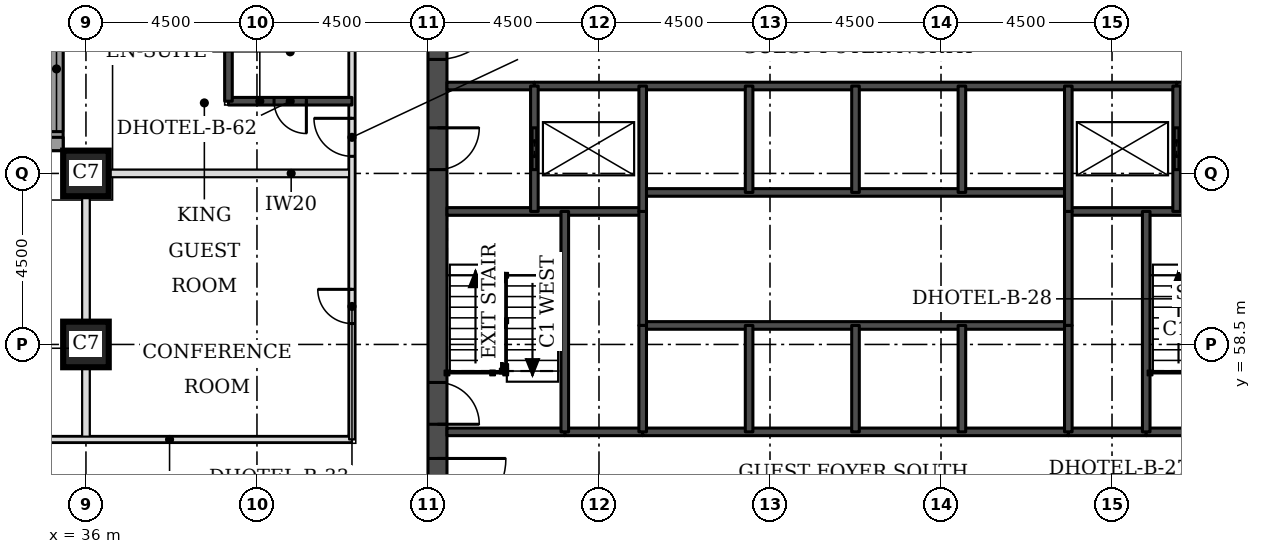
"""IFC4 building model, lengths in metres.
Left out: names, types, materials, properties, quantities, classifications, styles, units other than length and angle.
Written with IfcOpenShell. Run it as: python <this file> out.ifc"""

import sys

from ifc_helpers import new_model, si_unit, direction, frame, frame_2d, origin, origin_2d, place, context, subcontext, project, spatial, rectangle, extrude, element, fill, save


model = new_model("IFC4")
c1 = context("Model", 3, precision=1e-05, world=origin(), true_north=direction((0.0, 1.0)))
c2 = subcontext(c1, "Body", "Model", "MODEL_VIEW")
j1 = project(units=[si_unit("LENGTHUNIT", "METRE"), si_unit("PLANEANGLEUNIT", "RADIAN")], contexts=[c1])
p1 = place(None, origin())
s1 = spatial("IfcSite", under=j1, at=p1, CompositionType="ELEMENT")
p2 = place(p1, origin())
s2 = spatial("IfcBuilding", under=s1, at=p2, CompositionType="ELEMENT")
p3 = place(p2, frame((0.0, 0.0, 52.8)))
s3 = spatial("IfcBuildingStorey", under=s2, at=p3, CompositionType="ELEMENT", Elevation=52.8)
for number, where, z_axis, x_axis in (
    (1, (36.0, 58.5, 0.0), (0.0, 0.0, 1.0), (1.0, 0.0, 0.0)),
    (2, (36.0, 63.0, 0.0), (0.0, 0.0, 1.0), (1.0, 0.0, 0.0)),
):
    element("IfcColumn", number, at=place(p3, frame(where, z_axis=z_axis, x_axis=x_axis)), inside=s3, PredefinedType="COLUMN", context=c2, shape_type="SweptSolid", body=[
        extrude(rectangle(XDim=1.2, YDim=1.2, at=origin_2d()), origin(), (0.0, 0.0, 1.0), 3.3),
    ])
p4 = place(p3, frame((45.25, 49.5, 0.0), z_axis=(0.0, 0.0, 1.0), x_axis=(0.0, 1.0, 0.0)))
e3 = element("IfcWall", 3, at=p4, inside=s3, PredefinedType="SHEAR", context=c2, shape_type="SweptSolid", body=[
    extrude(rectangle(XDim=22.5, YDim=0.5, at=frame_2d((11.25, 0.0))), origin(), (0.0, 0.0, 1.0), 3.3),
])
p5 = place(p4, frame((4.2, 0.0, 0.0)))
e4 = element("IfcOpeningElement", 4, at=p5, cuts=e3, PredefinedType="OPENING", context=c2, shape_type="SweptSolid", body=[
    extrude(rectangle(XDim=1.8, YDim=2.1, at=frame_2d((0.9, 1.05))), frame((0.0, 0.26, 0.0), z_axis=(0.0, -1.0, 0.0), x_axis=(1.0, 0.0, 0.0)), (0.0, 0.0, 1.0), 0.52),
])
p6 = place(p4, frame((6.9, 0.0, 0.0)))
e5 = element("IfcOpeningElement", 5, at=p6, cuts=e3, PredefinedType="OPENING", context=c2, shape_type="SweptSolid", body=[
    extrude(rectangle(XDim=1.1, YDim=2.1, at=frame_2d((0.55, 1.05))), frame((0.0, 0.26, 0.0), z_axis=(0.0, -1.0, 0.0), x_axis=(1.0, 0.0, 0.0)), (0.0, 0.0, 1.0), 0.52),
])
p7 = place(p4, frame((13.6, 0.0, 0.0)))
e6 = element("IfcOpeningElement", 6, at=p7, cuts=e3, PredefinedType="OPENING", context=c2, shape_type="SweptSolid", body=[
    extrude(rectangle(XDim=1.1, YDim=2.1, at=frame_2d((0.55, 1.05))), frame((0.0, 0.26, 0.0), z_axis=(0.0, -1.0, 0.0), x_axis=(1.0, 0.0, 0.0)), (0.0, 0.0, 1.0), 0.52),
])
p8 = place(p4, frame((16.5, 0.0, 0.0)))
e7 = element("IfcOpeningElement", 7, at=p8, cuts=e3, PredefinedType="OPENING", context=c2, shape_type="SweptSolid", body=[
    extrude(rectangle(XDim=1.8, YDim=2.1, at=frame_2d((0.9, 1.05))), frame((0.0, 0.26, 0.0), z_axis=(0.0, -1.0, 0.0), x_axis=(1.0, 0.0, 0.0)), (0.0, 0.0, 1.0), 0.52),
])
p9 = place(p3, frame((35.225, 76.894, 0.0), z_axis=(0.0, 0.0, 1.0), x_axis=(0.0, -1.0, 0.0)))
e8 = element("IfcWall", 8, at=p9, inside=s3, PredefinedType="STANDARD", context=c2, shape_type="SweptSolid", body=[
    extrude(rectangle(XDim=13.293, YDim=0.35, at=frame_2d((6.647, 0.0))), origin(), (0.0, 0.0, 1.0), 3.055),
])
p10 = place(p9, frame((9.493, 0.0, 0.8)))
e9 = element("IfcOpeningElement", 9, at=p10, cuts=e8, PredefinedType="OPENING", context=c2, shape_type="SweptSolid", body=[
    extrude(rectangle(XDim=3.3, YDim=1.5, at=frame_2d((1.65, 0.75))), frame((0.0, 0.185, 0.0), z_axis=(0.0, -1.0, 0.0), x_axis=(1.0, 0.0, 0.0)), (0.0, 0.0, 1.0), 0.37),
])
p11 = place(p3, frame((35.4, 63.775, 0.0), z_axis=(0.0, 0.0, 1.0), x_axis=(-1.0, 0.0, 0.0)))
e10 = element("IfcWall", 10, at=p11, inside=s3, PredefinedType="STANDARD", context=c2, shape_type="SweptSolid", body=[
    extrude(rectangle(XDim=17.793, YDim=0.35, at=frame_2d((8.897, 0.0))), origin(), (0.0, 0.0, 1.0), 3.055),
])
p12 = place(p11, frame((0.5, 0.0, 0.8)))
e11 = element("IfcOpeningElement", 11, at=p12, cuts=e10, PredefinedType="OPENING", context=c2, shape_type="SweptSolid", body=[
    extrude(rectangle(XDim=3.3, YDim=1.5, at=frame_2d((1.65, 0.75))), frame((0.0, 0.185, 0.0), z_axis=(0.0, -1.0, 0.0), x_axis=(1.0, 0.0, 0.0)), (0.0, 0.0, 1.0), 0.37),
])
p13 = place(p11, frame((9.0, 0.0, 0.8)))
e12 = element("IfcOpeningElement", 12, at=p13, cuts=e10, PredefinedType="OPENING", context=c2, shape_type="SweptSolid", body=[
    extrude(rectangle(XDim=3.3, YDim=1.5, at=frame_2d((1.65, 0.75))), frame((0.0, 0.185, 0.0), z_axis=(0.0, -1.0, 0.0), x_axis=(1.0, 0.0, 0.0)), (0.0, 0.0, 1.0), 0.37),
])
p14 = place(p3, frame((36.0, 56.0, 0.0), z_axis=(0.0, 0.0, 1.0), x_axis=(0.0, 1.0, 0.0)))
e13 = element("IfcWall", 13, at=p14, inside=s3, PredefinedType="PARTITIONING", context=c2, shape_type="SweptSolid", body=[
    extrude(rectangle(XDim=6.4, YDim=0.2, at=frame_2d((3.2, 0.0))), origin(), (0.0, 0.0, 1.0), 2.33),
])
p15 = place(p3, frame((36.6, 63.0, 0.0), z_axis=(0.0, 0.0, 1.0), x_axis=(1.0, 0.0, 0.0)))
e14 = element("IfcWall", 14, at=p15, inside=s3, PredefinedType="PARTITIONING", context=c2, shape_type="SweptSolid", body=[
    extrude(rectangle(XDim=6.4, YDim=0.2, at=frame_2d((3.2, 0.0))), origin(), (0.0, 0.0, 1.0), 3.08),
])
p16 = place(p3, frame((27.0, 56.0, 0.0), z_axis=(0.0, 0.0, 1.0), x_axis=(1.0, 0.0, 0.0)))
e15 = element("IfcWall", 15, at=p16, inside=s3, PredefinedType="PARTITIONING", context=c2, shape_type="SweptSolid", body=[
    extrude(rectangle(XDim=16.0, YDim=0.15, at=frame_2d((8.0, 0.0))), origin(), (0.0, 0.0, 1.0), 3.08),
])
p17 = place(p16, frame((5.6, 0.0, 0.0)))
e16 = element("IfcOpeningElement", 16, at=p17, cuts=e15, PredefinedType="OPENING", context=c2, shape_type="SweptSolid", body=[
    extrude(rectangle(XDim=1.0, YDim=2.1, at=frame_2d((0.5, 1.05))), frame((0.0, 0.085, 0.0), z_axis=(0.0, -1.0, 0.0), x_axis=(1.0, 0.0, 0.0)), (0.0, 0.0, 1.0), 0.17),
])
p18 = place(p3, frame((43.0, 56.0, 0.0), z_axis=(0.0, 0.0, 1.0), x_axis=(0.0, 1.0, 0.0)))
e17 = element("IfcWall", 17, at=p18, inside=s3, PredefinedType="PARTITIONING", context=c2, shape_type="SweptSolid", body=[
    extrude(rectangle(XDim=18.0, YDim=0.15, at=frame_2d((9.0, 0.0))), origin(), (0.0, 0.0, 1.0), 3.08),
])
p19 = place(p18, frame((7.45, 0.0, 0.0)))
e18 = element("IfcOpeningElement", 18, at=p19, cuts=e17, PredefinedType="OPENING", context=c2, shape_type="SweptSolid", body=[
    extrude(rectangle(XDim=1.0, YDim=2.1, at=frame_2d((0.5, 1.05))), frame((0.0, 0.085, 0.0), z_axis=(0.0, -1.0, 0.0), x_axis=(1.0, 0.0, 0.0)), (0.0, 0.0, 1.0), 0.17),
])
p20 = place(p18, frame((14.3, 0.0, 0.0)))
e19 = element("IfcOpeningElement", 19, at=p20, cuts=e17, PredefinedType="OPENING", context=c2, shape_type="SweptSolid", body=[
    extrude(rectangle(XDim=1.0, YDim=2.1, at=frame_2d((0.5, 1.05))), frame((0.0, 0.085, 0.0), z_axis=(0.0, -1.0, 0.0), x_axis=(1.0, 0.0, 0.0)), (0.0, 0.0, 1.0), 0.17),
])
p21 = place(p18, frame((16.45, 0.0, 0.0)))
e20 = element("IfcOpeningElement", 20, at=p21, cuts=e17, PredefinedType="OPENING", context=c2, shape_type="SweptSolid", body=[
    extrude(rectangle(XDim=1.0, YDim=2.1, at=frame_2d((0.5, 1.05))), frame((0.0, 0.085, 0.0), z_axis=(0.0, -1.0, 0.0), x_axis=(1.0, 0.0, 0.0)), (0.0, 0.0, 1.0), 0.17),
])
p22 = place(p18, frame((3.05, 0.0, 0.0)))
e21 = element("IfcOpeningElement", 21, at=p22, cuts=e17, PredefinedType="OPENING", context=c2, shape_type="SweptSolid", body=[
    extrude(rectangle(XDim=0.9, YDim=2.1, at=frame_2d((0.45, 1.05))), frame((0.0, 0.085, 0.0), z_axis=(0.0, -1.0, 0.0), x_axis=(1.0, 0.0, 0.0)), (0.0, 0.0, 1.0), 0.17),
])
p23 = place(p3, frame((39.75, 64.9, 0.0), z_axis=(0.0, 0.0, 1.0), x_axis=(1.0, 0.0, 0.0)))
e22 = element("IfcWall", 22, at=p23, inside=s3, PredefinedType="SOLIDWALL", context=c2, shape_type="SweptSolid", body=[
    extrude(rectangle(XDim=3.25, YDim=0.2, at=frame_2d((1.625, 0.0))), origin(), (0.0, 0.0, 1.0), 3.08),
])
p24 = place(p23, frame((1.2, 0.0, 0.0)))
e23 = element("IfcOpeningElement", 23, at=p24, cuts=e22, PredefinedType="OPENING", context=c2, shape_type="SweptSolid", body=[
    extrude(rectangle(XDim=0.85, YDim=2.1, at=frame_2d((0.425, 1.05))), frame((0.0, 0.11, 0.0), z_axis=(0.0, -1.0, 0.0), x_axis=(1.0, 0.0, 0.0)), (0.0, 0.0, 1.0), 0.22),
])
p25 = place(p3, frame((39.75, 64.9, 0.0), z_axis=(0.0, 0.0, 1.0), x_axis=(0.0, 1.0, 0.0)))
e24 = element("IfcWall", 24, at=p25, inside=s3, PredefinedType="SOLIDWALL", context=c2, shape_type="SweptSolid", body=[
    extrude(rectangle(XDim=2.6, YDim=0.2, at=frame_2d((1.3, 0.0))), origin(), (0.0, 0.0, 1.0), 3.08),
])
for number, where, z_axis, x_axis in (
    (25, (48.6, 56.2, 0.0), (0.0, 0.0, 1.0), (1.0, 0.0, 0.0)),
    (26, (61.85, 56.2, 0.0), (0.0, 0.0, 1.0), (1.0, 0.0, 0.0)),
):
    element("IfcWall", number, at=place(p3, frame(where, z_axis=z_axis, x_axis=x_axis)), inside=s3, PredefinedType="SOLIDWALL", context=c2, shape_type="SweptSolid", body=[
        extrude(rectangle(XDim=2.05, YDim=0.2, at=frame_2d((1.025, 0.0))), origin(), (0.0, 0.0, 1.0), 3.08),
    ])
p26 = place(p3, frame((45.5, 56.2, 0.0), z_axis=(0.0, 0.0, 1.0), x_axis=(1.0, 0.0, 0.0)))
e27 = element("IfcWall", 27, at=p26, inside=s3, PredefinedType="SOLIDWALL", context=c2, shape_type="SweptSolid", body=[
    extrude(rectangle(XDim=3.1, YDim=0.2, at=frame_2d((1.55, 0.0))), origin(), (0.0, 0.0, 1.0), 3.08),
])
p27 = place(p3, frame((50.65, 56.2, 0.0), z_axis=(0.0, 0.0, 1.0), x_axis=(1.0, 0.0, 0.0)))
e28 = element("IfcWall", 28, at=p27, inside=s3, PredefinedType="SOLIDWALL", context=c2, shape_type="SweptSolid", body=[
    extrude(rectangle(XDim=11.2, YDim=0.2, at=frame_2d((5.6, 0.0))), origin(), (0.0, 0.0, 1.0), 3.08),
])
p28 = place(p3, frame((63.9, 56.2, 0.0), z_axis=(0.0, 0.0, 1.0), x_axis=(1.0, 0.0, 0.0)))
e29 = element("IfcWall", 29, at=p28, inside=s3, PredefinedType="SOLIDWALL", context=c2, shape_type="SweptSolid", body=[
    extrude(rectangle(XDim=3.1, YDim=0.2, at=frame_2d((1.55, 0.0))), origin(), (0.0, 0.0, 1.0), 3.08),
])
p29 = place(p3, frame((50.65, 59.0, 0.0), z_axis=(0.0, 0.0, 1.0), x_axis=(1.0, 0.0, 0.0)))
e30 = element("IfcWall", 30, at=p29, inside=s3, PredefinedType="SOLIDWALL", context=c2, shape_type="SweptSolid", body=[
    extrude(rectangle(XDim=11.2, YDim=0.2, at=frame_2d((5.6, 0.0))), origin(), (0.0, 0.0, 1.0), 3.3),
])
for number, where, z_axis, x_axis in (
    (31, (45.5, 62.0, 0.0), (0.0, 0.0, 1.0), (1.0, 0.0, 0.0)),
    (32, (61.85, 62.0, 0.0), (0.0, 0.0, 1.0), (1.0, 0.0, 0.0)),
):
    element("IfcWall", number, at=place(p3, frame(where, z_axis=z_axis, x_axis=x_axis)), inside=s3, PredefinedType="SOLIDWALL", context=c2, shape_type="SweptSolid", body=[
        extrude(rectangle(XDim=5.15, YDim=0.2, at=frame_2d((2.575, 0.0))), origin(), (0.0, 0.0, 1.0), 3.08),
    ])
p30 = place(p3, frame((50.65, 62.5, 0.0), z_axis=(0.0, 0.0, 1.0), x_axis=(1.0, 0.0, 0.0)))
e33 = element("IfcWall", 33, at=p30, inside=s3, PredefinedType="SOLIDWALL", context=c2, shape_type="SweptSolid", body=[
    extrude(rectangle(XDim=11.2, YDim=0.2, at=frame_2d((5.6, 0.0))), origin(), (0.0, 0.0, 1.0), 3.3),
])
for number, where, z_axis, x_axis in (
    (34, (45.5, 65.3, 0.0), (0.0, 0.0, 1.0), (1.0, 0.0, 0.0)),
    (35, (64.7, 65.3, 0.0), (0.0, 0.0, 1.0), (1.0, 0.0, 0.0)),
):
    element("IfcWall", number, at=place(p3, frame(where, z_axis=z_axis, x_axis=x_axis)), inside=s3, PredefinedType="SOLIDWALL", context=c2, shape_type="SweptSolid", body=[
        extrude(rectangle(XDim=2.3, YDim=0.2, at=frame_2d((1.15, 0.0))), origin(), (0.0, 0.0, 1.0), 3.08),
    ])
p31 = place(p3, frame((47.8, 65.3, 0.0), z_axis=(0.0, 0.0, 1.0), x_axis=(1.0, 0.0, 0.0)))
e36 = element("IfcWall", 36, at=p31, inside=s3, PredefinedType="SOLIDWALL", context=c2, shape_type="SweptSolid", body=[
    extrude(rectangle(XDim=16.9, YDim=0.2, at=frame_2d((8.45, 0.0))), origin(), (0.0, 0.0, 1.0), 3.08),
])
p32 = place(p3, frame((47.8, 62.0, 0.0), z_axis=(0.0, 0.0, 1.0), x_axis=(0.0, 1.0, 0.0)))
e37 = element("IfcWall", 37, at=p32, inside=s3, PredefinedType="SOLIDWALL", context=c2, shape_type="SweptSolid", body=[
    extrude(rectangle(XDim=3.3, YDim=0.2, at=frame_2d((1.65, 0.0))), origin(), (0.0, 0.0, 1.0), 3.08),
])
p33 = place(p32, frame((1.1, 0.0, 0.0)))
e38 = element("IfcOpeningElement", 38, at=p33, cuts=e37, PredefinedType="OPENING", context=c2, shape_type="SweptSolid", body=[
    extrude(rectangle(XDim=1.1, YDim=2.1, at=frame_2d((0.55, 1.05))), frame((0.0, 0.11, 0.0), z_axis=(0.0, -1.0, 0.0), x_axis=(1.0, 0.0, 0.0)), (0.0, 0.0, 1.0), 0.22),
])
p34 = place(p3, frame((48.6, 56.2, 0.0), z_axis=(0.0, 0.0, 1.0), x_axis=(0.0, 1.0, 0.0)))
e39 = element("IfcWall", 39, at=p34, inside=s3, PredefinedType="SOLIDWALL", context=c2, shape_type="SweptSolid", body=[
    extrude(rectangle(XDim=5.8, YDim=0.2, at=frame_2d((2.9, 0.0))), origin(), (0.0, 0.0, 1.0), 3.08),
])
p35 = place(p3, frame((50.65, 59.0, 0.0), z_axis=(0.0, 0.0, 1.0), x_axis=(0.0, 1.0, 0.0)))
e40 = element("IfcWall", 40, at=p35, inside=s3, PredefinedType="SOLIDWALL", context=c2, shape_type="SweptSolid", body=[
    extrude(rectangle(XDim=3.0, YDim=0.2, at=frame_2d((1.5, 0.0))), origin(), (0.0, 0.0, 1.0), 3.3),
])
p36 = place(p3, frame((50.65, 56.2, 0.0), z_axis=(0.0, 0.0, 1.0), x_axis=(0.0, 1.0, 0.0)))
e41 = element("IfcWall", 41, at=p36, inside=s3, PredefinedType="SOLIDWALL", context=c2, shape_type="SweptSolid", body=[
    extrude(rectangle(XDim=2.8, YDim=0.2, at=frame_2d((1.4, 0.0))), origin(), (0.0, 0.0, 1.0), 3.08),
])
p37 = place(p3, frame((50.65, 62.0, 0.0), z_axis=(0.0, 0.0, 1.0), x_axis=(0.0, 1.0, 0.0)))
e42 = element("IfcWall", 42, at=p37, inside=s3, PredefinedType="SOLIDWALL", context=c2, shape_type="SweptSolid", body=[
    extrude(rectangle(XDim=3.3, YDim=0.2, at=frame_2d((1.65, 0.0))), origin(), (0.0, 0.0, 1.0), 3.08),
])
for number, where, z_axis, x_axis in (
    (43, (53.45, 56.2, 0.0), (0.0, 0.0, 1.0), (0.0, 1.0, 0.0)),
    (44, (53.45, 62.5, 0.0), (0.0, 0.0, 1.0), (0.0, 1.0, 0.0)),
    (45, (56.25, 56.2, 0.0), (0.0, 0.0, 1.0), (0.0, 1.0, 0.0)),
    (46, (56.25, 62.5, 0.0), (0.0, 0.0, 1.0), (0.0, 1.0, 0.0)),
    (47, (59.05, 56.2, 0.0), (0.0, 0.0, 1.0), (0.0, 1.0, 0.0)),
    (48, (59.05, 62.5, 0.0), (0.0, 0.0, 1.0), (0.0, 1.0, 0.0)),
):
    element("IfcWall", number, at=place(p3, frame(where, z_axis=z_axis, x_axis=x_axis)), inside=s3, PredefinedType="SOLIDWALL", context=c2, shape_type="SweptSolid", body=[
        extrude(rectangle(XDim=2.8, YDim=0.2, at=frame_2d((1.4, 0.0))), origin(), (0.0, 0.0, 1.0), 3.08),
    ])
p38 = place(p3, frame((61.85, 59.0, 0.0), z_axis=(0.0, 0.0, 1.0), x_axis=(0.0, 1.0, 0.0)))
e49 = element("IfcWall", 49, at=p38, inside=s3, PredefinedType="SOLIDWALL", context=c2, shape_type="SweptSolid", body=[
    extrude(rectangle(XDim=3.0, YDim=0.2, at=frame_2d((1.5, 0.0))), origin(), (0.0, 0.0, 1.0), 3.3),
])
p39 = place(p3, frame((61.85, 56.2, 0.0), z_axis=(0.0, 0.0, 1.0), x_axis=(0.0, 1.0, 0.0)))
e50 = element("IfcWall", 50, at=p39, inside=s3, PredefinedType="SOLIDWALL", context=c2, shape_type="SweptSolid", body=[
    extrude(rectangle(XDim=2.8, YDim=0.2, at=frame_2d((1.4, 0.0))), origin(), (0.0, 0.0, 1.0), 3.08),
])
p40 = place(p3, frame((61.85, 62.0, 0.0), z_axis=(0.0, 0.0, 1.0), x_axis=(0.0, 1.0, 0.0)))
e51 = element("IfcWall", 51, at=p40, inside=s3, PredefinedType="SOLIDWALL", context=c2, shape_type="SweptSolid", body=[
    extrude(rectangle(XDim=3.3, YDim=0.2, at=frame_2d((1.65, 0.0))), origin(), (0.0, 0.0, 1.0), 3.08),
])
p41 = place(p3, frame((63.9, 56.2, 0.0), z_axis=(0.0, 0.0, 1.0), x_axis=(0.0, 1.0, 0.0)))
e52 = element("IfcWall", 52, at=p41, inside=s3, PredefinedType="SOLIDWALL", context=c2, shape_type="SweptSolid", body=[
    extrude(rectangle(XDim=5.8, YDim=0.2, at=frame_2d((2.9, 0.0))), origin(), (0.0, 0.0, 1.0), 3.08),
])
p42 = place(p3, frame((64.7, 62.0, 0.0), z_axis=(0.0, 0.0, 1.0), x_axis=(0.0, 1.0, 0.0)))
e53 = element("IfcWall", 53, at=p42, inside=s3, PredefinedType="SOLIDWALL", context=c2, shape_type="SweptSolid", body=[
    extrude(rectangle(XDim=3.3, YDim=0.2, at=frame_2d((1.65, 0.0))), origin(), (0.0, 0.0, 1.0), 3.08),
])
p43 = place(p42, frame((1.1, 0.0, 0.0)))
e54 = element("IfcOpeningElement", 54, at=p43, cuts=e53, PredefinedType="OPENING", context=c2, shape_type="SweptSolid", body=[
    extrude(rectangle(XDim=1.1, YDim=2.1, at=frame_2d((0.55, 1.05))), frame((0.0, 0.11, 0.0), z_axis=(0.0, -1.0, 0.0), x_axis=(1.0, 0.0, 0.0)), (0.0, 0.0, 1.0), 0.22),
])
p44 = place(p10, origin())
e55 = element("IfcWindow", 55, at=p44, inside=s3, PartitioningType="SINGLE_PANEL", PredefinedType="WINDOW", context=c2, shape_type="SweptSolid", body=[
    extrude(rectangle(XDim=3.3, YDim=1.5, at=frame_2d((1.65, 0.75))), frame((0.0, 0.085, 0.0), z_axis=(0.0, -1.0, 0.0), x_axis=(1.0, 0.0, 0.0)), (0.0, 0.0, 1.0), 0.06),
])
fill(e9, e55)
p45 = place(p19, origin())
e56 = element("IfcDoor", 56, at=p45, inside=s3, OperationType="SINGLE_SWING_RIGHT", PredefinedType="DOOR", context=c2, shape_type="SweptSolid", body=[
    extrude(rectangle(XDim=1.0, YDim=2.1, at=frame_2d((0.5, 1.05))), frame((0.0, 0.025, 0.0), z_axis=(0.0, -1.0, 0.0), x_axis=(1.0, 0.0, 0.0)), (0.0, 0.0, 1.0), 0.05),
])
fill(e18, e56)
p46 = place(p24, frame((0.85, 0.0, 0.0), z_axis=(0.0, 0.0, 1.0), x_axis=(-1.0, 0.0, 0.0)))
e57 = element("IfcDoor", 57, at=p46, inside=s3, OperationType="SINGLE_SWING_LEFT", PredefinedType="DOOR", context=c2, shape_type="SweptSolid", body=[
    extrude(rectangle(XDim=0.85, YDim=2.1, at=frame_2d((0.425, 1.05))), frame((0.0, 0.025, 0.0), z_axis=(0.0, -1.0, 0.0), x_axis=(1.0, 0.0, 0.0)), (0.0, 0.0, 1.0), 0.05),
])
fill(e23, e57)
p47 = place(p22, origin())
e58 = element("IfcDoor", 58, at=p47, inside=s3, OperationType="SINGLE_SWING_RIGHT", PredefinedType="DOOR", context=c2, shape_type="SweptSolid", body=[
    extrude(rectangle(XDim=0.9, YDim=2.1, at=frame_2d((0.45, 1.05))), frame((0.0, 0.025, 0.0), z_axis=(0.0, -1.0, 0.0), x_axis=(1.0, 0.0, 0.0)), (0.0, 0.0, 1.0), 0.05),
])
fill(e21, e58)
p48 = place(p33, origin())
e59 = element("IfcDoor", 59, at=p48, inside=s3, OperationType="DOUBLE_DOOR_SLIDING", PredefinedType="DOOR", context=c2, shape_type="SweptSolid", body=[
    extrude(rectangle(XDim=1.1, YDim=2.1, at=frame_2d((0.55, 1.05))), frame((0.0, 0.025, 0.0), z_axis=(0.0, -1.0, 0.0), x_axis=(1.0, 0.0, 0.0)), (0.0, 0.0, 1.0), 0.05),
])
fill(e38, e59)
p49 = place(p43, origin())
e60 = element("IfcDoor", 60, at=p49, inside=s3, OperationType="DOUBLE_DOOR_SLIDING", PredefinedType="DOOR", context=c2, shape_type="SweptSolid", body=[
    extrude(rectangle(XDim=1.1, YDim=2.1, at=frame_2d((0.55, 1.05))), frame((0.0, 0.025, 0.0), z_axis=(0.0, -1.0, 0.0), x_axis=(1.0, 0.0, 0.0)), (0.0, 0.0, 1.0), 0.05),
])
fill(e54, e60)
p50 = place(p5, frame((1.8, 0.0, 0.0), z_axis=(0.0, 0.0, 1.0), x_axis=(-1.0, 0.0, 0.0)))
e61 = element("IfcDoor", 61, at=p50, inside=s3, OperationType="SINGLE_SWING_LEFT", PredefinedType="DOOR", context=c2, shape_type="SweptSolid", body=[
    extrude(rectangle(XDim=1.8, YDim=2.1, at=frame_2d((0.9, 1.05))), frame((0.0, 0.025, 0.0), z_axis=(0.0, -1.0, 0.0), x_axis=(1.0, 0.0, 0.0)), (0.0, 0.0, 1.0), 0.05),
])
fill(e4, e61)
p51 = place(p6, frame((1.1, 0.0, 0.0), z_axis=(0.0, 0.0, 1.0), x_axis=(-1.0, 0.0, 0.0)))
e62 = element("IfcDoor", 62, at=p51, inside=s3, OperationType="SINGLE_SWING_RIGHT", PredefinedType="DOOR", context=c2, shape_type="SweptSolid", body=[
    extrude(rectangle(XDim=1.1, YDim=2.1, at=frame_2d((0.55, 1.05))), frame((0.0, 0.025, 0.0), z_axis=(0.0, -1.0, 0.0), x_axis=(1.0, 0.0, 0.0)), (0.0, 0.0, 1.0), 0.05),
])
fill(e5, e62)
p52 = place(p7, frame((1.1, 0.0, 0.0), z_axis=(0.0, 0.0, 1.0), x_axis=(-1.0, 0.0, 0.0)))
e63 = element("IfcDoor", 63, at=p52, inside=s3, OperationType="SINGLE_SWING_LEFT", PredefinedType="DOOR", context=c2, shape_type="SweptSolid", body=[
    extrude(rectangle(XDim=1.1, YDim=2.1, at=frame_2d((0.55, 1.05))), frame((0.0, 0.025, 0.0), z_axis=(0.0, -1.0, 0.0), x_axis=(1.0, 0.0, 0.0)), (0.0, 0.0, 1.0), 0.05),
])
fill(e6, e63)
p53 = place(p8, frame((1.8, 0.0, 0.0), z_axis=(0.0, 0.0, 1.0), x_axis=(-1.0, 0.0, 0.0)))
e64 = element("IfcDoor", 64, at=p53, inside=s3, OperationType="SINGLE_SWING_LEFT", PredefinedType="DOOR", context=c2, shape_type="SweptSolid", body=[
    extrude(rectangle(XDim=1.8, YDim=2.1, at=frame_2d((0.9, 1.05))), frame((0.0, 0.025, 0.0), z_axis=(0.0, -1.0, 0.0), x_axis=(1.0, 0.0, 0.0)), (0.0, 0.0, 1.0), 0.05),
])
fill(e7, e64)
save(model, sys.argv[1])
